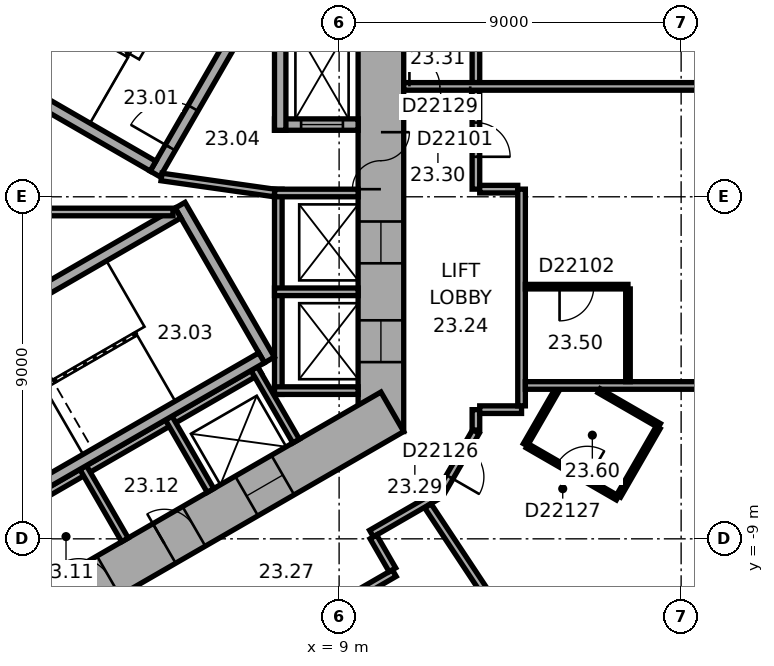
"""IFC4 building model, lengths in metres.
Left out: names, types, materials, properties, quantities, classifications, styles, units other than length and angle.
Written with IfcOpenShell. Run it as: python <this file> out.ifc"""

import sys

from ifc_helpers import new_model, si_unit, direction, frame, frame_2d, origin, place, context, subcontext, project, spatial, rectangle, extrude, element, fill, save


model = new_model("IFC4")
c1 = context("Model", 3, precision=1e-05, world=origin(), true_north=direction((0.0, 1.0)))
c2 = subcontext(c1, "Body", "Model", "MODEL_VIEW")
j1 = project(units=[si_unit("LENGTHUNIT", "METRE"), si_unit("PLANEANGLEUNIT", "RADIAN")], contexts=[c1])
p1 = place(None, origin())
s1 = spatial("IfcSite", under=j1, at=p1, CompositionType="ELEMENT")
p2 = place(p1, origin())
s2 = spatial("IfcBuilding", under=s1, at=p2, CompositionType="ELEMENT")
p3 = place(p2, frame((0.0, 0.0, 100.1)))
s3 = spatial("IfcBuildingStorey", under=s2, at=p3, CompositionType="ELEMENT", Elevation=100.1)
p4 = place(p3, frame((10.1, -6.177, 0.0), z_axis=(0.0, 0.0, 1.0), x_axis=(0.0, 1.0, 0.0)))
e1 = element("IfcWall", 1, at=p4, inside=s3, PredefinedType="SHEAR", context=c2, shape_type="SweptSolid", body=[
    extrude(rectangle(XDim=12.355, YDim=1.2, at=frame_2d((6.177, 0.0))), origin(), (0.0, 0.0, 1.0), 3.3),
])
p5 = place(p4, frame((6.378, 0.0, 0.0)))
e2 = element("IfcOpeningElement", 2, at=p5, cuts=e1, PredefinedType="OPENING", context=c2, shape_type="SweptSolid", body=[
    extrude(rectangle(XDim=1.5, YDim=2.1, at=frame_2d((0.75, 1.05))), frame((0.0, 0.61, 0.0), z_axis=(0.0, -1.0, 0.0), x_axis=(1.0, 0.0, 0.0)), (0.0, 0.0, 1.0), 1.22),
])
p6 = place(p4, frame((1.828, 0.0, 0.0)))
e3 = element("IfcOpeningElement", 3, at=p6, cuts=e1, PredefinedType="OPENING", context=c2, shape_type="SweptSolid", body=[
    extrude(rectangle(XDim=1.1, YDim=2.1, at=frame_2d((0.55, 1.05))), frame((0.0, 0.61, 0.0), z_axis=(0.0, -1.0, 0.0), x_axis=(1.0, 0.0, 0.0)), (0.0, 0.0, 1.0), 1.22),
])
p7 = place(p4, frame((4.427, 0.0, 0.0)))
e4 = element("IfcOpeningElement", 4, at=p7, cuts=e1, PredefinedType="OPENING", context=c2, shape_type="SweptSolid", body=[
    extrude(rectangle(XDim=1.1, YDim=2.1, at=frame_2d((0.55, 1.05))), frame((0.0, 0.61, 0.0), z_axis=(0.0, -1.0, 0.0), x_axis=(1.0, 0.0, 0.0)), (0.0, 0.0, 1.0), 1.22),
])
p8 = place(p3, frame((-0.3, -11.836, 0.0), z_axis=(0.0, 0.0, 1.0), x_axis=(0.866021384402, 0.500006961711, 0.0)))
e5 = element("IfcWall", 5, at=p8, inside=s3, PredefinedType="SHEAR", context=c2, shape_type="SweptSolid", body=[
    extrude(rectangle(XDim=12.355, YDim=1.2, at=frame_2d((6.178, 0.0))), origin(), (0.0, 0.0, 1.0), 3.3),
])
p9 = place(p8, frame((2.828, 0.0, 0.0)))
e6 = element("IfcOpeningElement", 6, at=p9, cuts=e5, PredefinedType="OPENING", context=c2, shape_type="SweptSolid", body=[
    extrude(rectangle(XDim=0.9, YDim=2.1, at=frame_2d((0.45, 1.05))), frame((0.0, 0.61, 0.0), z_axis=(0.0, -1.0, 0.0), x_axis=(1.0, 0.0, 0.0)), (0.0, 0.0, 1.0), 1.22),
])
p10 = place(p8, frame((5.428, 0.0, 0.0)))
e7 = element("IfcOpeningElement", 7, at=p10, cuts=e5, PredefinedType="OPENING", context=c2, shape_type="SweptSolid", body=[
    extrude(rectangle(XDim=0.9, YDim=2.1, at=frame_2d((0.45, 1.05))), frame((0.0, 0.61, 0.0), z_axis=(0.0, -1.0, 0.0), x_axis=(1.0, 0.0, 0.0)), (0.0, 0.0, 1.0), 1.22),
])
p11 = place(p8, frame((7.928, 0.0, 0.0)))
e8 = element("IfcOpeningElement", 8, at=p11, cuts=e5, PredefinedType="OPENING", context=c2, shape_type="SweptSolid", body=[
    extrude(rectangle(XDim=1.1, YDim=2.1, at=frame_2d((0.55, 1.05))), frame((0.0, 0.61, 0.0), z_axis=(0.0, -1.0, 0.0), x_axis=(1.0, 0.0, 0.0)), (0.0, 0.0, 1.0), 1.22),
])
p12 = place(p3, frame((7.4, -5.2, 0.0), z_axis=(0.0, 0.0, 1.0), x_axis=(0.0, 1.0, 0.0)))
e9 = element("IfcWall", 9, at=p12, inside=s3, PredefinedType="PARTITIONING", context=c2, shape_type="SweptSolid", body=[
    extrude(rectangle(XDim=5.4, YDim=0.2, at=frame_2d((2.7, 0.0))), origin(), (0.0, 0.0, 1.0), 3.05),
])
for number, where, z_axis, x_axis in (
    (10, (7.3, -5.1, 0.0), (0.0, 0.0, 1.0), (1.0, 0.0, 0.0)),
    (11, (7.3, -2.5, 0.0), (0.0, 0.0, 1.0), (1.0, 0.0, 0.0)),
    (12, (7.3, 0.1, 0.0), (0.0, 0.0, 1.0), (1.0, 0.0, 0.0)),
):
    element("IfcWall", number, at=place(p3, frame(where, z_axis=z_axis, x_axis=x_axis)), inside=s3, PredefinedType="PARTITIONING", context=c2, shape_type="SweptSolid", body=[
        extrude(rectangle(XDim=2.2, YDim=0.2, at=frame_2d((1.1, 0.0))), origin(), (0.0, 0.0, 1.0), 3.05),
    ])
p13 = place(p3, frame((-0.024, -8.559, 0.0), z_axis=(0.0, 0.0, 1.0), x_axis=(0.866026010844, 0.49999894854, 0.0)))
e13 = element("IfcWall", 13, at=p13, inside=s3, PredefinedType="PARTITIONING", context=c2, shape_type="SweptSolid", body=[
    extrude(rectangle(XDim=8.0, YDim=0.2, at=frame_2d((4.0, 0.0))), origin(), (0.0, 0.0, 1.0), 3.05),
])
for number, where, z_axis, x_axis in (
    (14, (2.264, -7.122, 0.0), (0.0, 0.0, 1.0), (0.5, -0.866, 0.0)),
    (15, (4.516, -5.822, 0.0), (0.0, 0.0, 1.0), (0.5, -0.866, 0.0)),
    (16, (6.768, -4.522, 0.0), (0.0, 0.0, 1.0), (0.5, -0.866, 0.0)),
):
    element("IfcWall", number, at=place(p3, frame(where, z_axis=z_axis, x_axis=x_axis)), inside=s3, PredefinedType="PARTITIONING", context=c2, shape_type="SweptSolid", body=[
        extrude(rectangle(XDim=2.2, YDim=0.2, at=frame_2d((1.1, 0.0))), origin(), (0.0, 0.0, 1.0), 3.05),
    ])
p14 = place(p3, frame((4.158, 0.602, 0.0), z_axis=(0.0, 0.0, 1.0), x_axis=(0.499977259774, 0.866038532462, 0.0)))
e17 = element("IfcWall", 17, at=p14, inside=s3, PredefinedType="SHEAR", context=c2, shape_type="SweptSolid", body=[
    extrude(rectangle(XDim=4.7, YDim=0.3, at=frame_2d((2.35, 0.0))), origin(), (0.0, 0.0, 1.0), 3.05),
])
p15 = place(p14, frame((0.8, 0.0, 0.0)))
e18 = element("IfcOpeningElement", 18, at=p15, cuts=e17, PredefinedType="OPENING", context=c2, shape_type="SweptSolid", body=[
    extrude(rectangle(XDim=1.2, YDim=2.1, at=frame_2d((0.6, 1.05))), frame((0.0, 0.16, 0.0), z_axis=(0.0, -1.0, 0.0), x_axis=(1.0, 0.0, 0.0)), (0.0, 0.0, 1.0), 0.32),
])
p16 = place(p3, frame((4.103, 0.807, 0.0), z_axis=(0.0, 0.0, 1.0), x_axis=(-0.866027801685, 0.499995846692, 0.0)))
e19 = element("IfcWall", 19, at=p16, inside=s3, PredefinedType="SHEAR", context=c2, shape_type="SweptSolid", body=[
    extrude(rectangle(XDim=7.06, YDim=0.3, at=frame_2d((3.53, 0.0))), origin(), (0.0, 0.0, 1.0), 3.05),
])
p17 = place(p3, frame((4.816, -0.222, 0.0), z_axis=(0.0, 0.0, 1.0), x_axis=(0.499977259774, -0.866038532462, 0.0)))
e20 = element("IfcWall", 20, at=p17, inside=s3, PredefinedType="SHEAR", context=c2, shape_type="SweptSolid", body=[
    extrude(rectangle(XDim=4.7, YDim=0.3, at=frame_2d((2.35, 0.0))), origin(), (0.0, 0.0, 1.0), 3.05),
])
for number, where, z_axis, x_axis in (
    (21, (-1.353, -3.957, 0.0), (0.0, 0.0, 1.0), (0.866, 0.5, 0.0)),
    (22, (0.847, -7.767, 0.0), (0.0, 0.0, 1.0), (0.866, 0.5, 0.0)),
):
    element("IfcWall", number, at=place(p3, frame(where, z_axis=z_axis, x_axis=x_axis)), inside=s3, PredefinedType="SHEAR", context=c2, shape_type="SweptSolid", body=[
        extrude(rectangle(XDim=7.06, YDim=0.3, at=frame_2d((3.53, 0.0))), origin(), (0.0, 0.0, 1.0), 3.05),
    ])
p18 = place(p3, frame((7.3, 1.9, 0.0), z_axis=(0.0, 0.0, 1.0), x_axis=(1.0, 0.0, 0.0)))
e23 = element("IfcWall", 23, at=p18, inside=s3, PredefinedType="SHEAR", context=c2, shape_type="SweptSolid", body=[
    extrude(rectangle(XDim=2.2, YDim=0.3, at=frame_2d((1.1, 0.0))), origin(), (0.0, 0.0, 1.0), 3.05),
])
p19 = place(p18, frame((0.7, 0.0, 0.0)))
e24 = element("IfcOpeningElement", 24, at=p19, cuts=e23, PredefinedType="OPENING", context=c2, shape_type="SweptSolid", body=[
    extrude(rectangle(XDim=1.1, YDim=2.1, at=frame_2d((0.55, 1.05))), frame((0.0, 0.16, 0.0), z_axis=(0.0, -1.0, 0.0), x_axis=(1.0, 0.0, 0.0)), (0.0, 0.0, 1.0), 0.32),
])
p20 = place(p3, frame((7.45, 1.75, 0.0), z_axis=(0.0, 0.0, 1.0), x_axis=(0.0, 1.0, 0.0)))
e25 = element("IfcWall", 25, at=p20, inside=s3, PredefinedType="SHEAR", context=c2, shape_type="SweptSolid", body=[
    extrude(rectangle(XDim=3.35, YDim=0.3, at=frame_2d((1.675, 0.0))), origin(), (0.0, 0.0, 1.0), 3.05),
])
p21 = place(p3, frame((4.327, 0.521, 0.0), z_axis=(0.0, 0.0, 1.0), x_axis=(0.990124376366, -0.14019172346, 0.0)))
e26 = element("IfcWall", 26, at=p21, inside=s3, PredefinedType="PARTITIONING", context=c2, shape_type="SweptSolid", body=[
    extrude(rectangle(XDim=3.002, YDim=0.2, at=frame_2d((1.501, 0.0))), origin(), (0.0, 0.0, 1.0), 3.05),
])
p22 = place(p3, frame((-2.72, -0.4, 0.0), z_axis=(0.0, 0.0, 1.0), x_axis=(1.0, 0.0, 0.0)))
e27 = element("IfcWall", 27, at=p22, inside=s3, PredefinedType="PARTITIONING", context=c2, shape_type="SweptSolid", body=[
    extrude(rectangle(XDim=7.347, YDim=0.2, at=frame_2d((3.674, 0.0))), origin(), (0.0, 0.0, 1.0), 3.05),
])
p23 = place(p3, frame((7.419, -11.653, 0.0), z_axis=(0.0, 0.0, 1.0), x_axis=(0.866038154057, 0.49997791523, 0.0)))
e28 = element("IfcWall", 28, at=p23, inside=s3, PredefinedType="PARTITIONING", context=c2, shape_type="SweptSolid", body=[
    extrude(rectangle(XDim=3.502, YDim=0.2, at=frame_2d((1.751, 0.0))), origin(), (0.0, 0.0, 1.0), 3.05),
])
p24 = place(p3, frame((9.852, -8.861, 0.0), z_axis=(0.0, 0.0, 1.0), x_axis=(0.866013291437, 0.500020978615, 0.0)))
e29 = element("IfcWall", 29, at=p24, inside=s3, PredefinedType="PARTITIONING", context=c2, shape_type="SweptSolid", body=[
    extrude(rectangle(XDim=2.077, YDim=0.2, at=frame_2d((1.038, 0.0))), origin(), (0.0, 0.0, 1.0), 3.05),
])
p25 = place(p3, frame((10.402, -9.815, 0.0), z_axis=(0.0, 0.0, 1.0), x_axis=(-0.499968756647, 0.866043441391, 0.0)))
e30 = element("IfcWall", 30, at=p25, inside=s3, PredefinedType="PARTITIONING", context=c2, shape_type="SweptSolid", body=[
    extrude(rectangle(XDim=1.001, YDim=0.2, at=frame_2d((0.5, 0.0))), origin(), (0.0, 0.0, 1.0), 3.05),
])
p26 = place(p3, frame((11.67, -7.788, 0.0), z_axis=(0.0, 0.0, 1.0), x_axis=(0.500063286585, 0.865988862174, 0.0)))
e31 = element("IfcWall", 31, at=p26, inside=s3, PredefinedType="PARTITIONING", context=c2, shape_type="SweptSolid", body=[
    extrude(rectangle(XDim=1.86, YDim=0.2, at=frame_2d((0.93, 0.0))), origin(), (0.0, 0.0, 1.0), 3.05),
])
p27 = place(p26, frame((0.48, 0.0, 0.0)))
e32 = element("IfcOpeningElement", 32, at=p27, cuts=e31, PredefinedType="OPENING", context=c2, shape_type="SweptSolid", body=[
    extrude(rectangle(XDim=0.9, YDim=2.1, at=frame_2d((0.45, 1.05))), frame((0.0, 0.11, 0.0), z_axis=(0.0, -1.0, 0.0), x_axis=(1.0, 0.0, 0.0)), (0.0, 0.0, 1.0), 0.22),
])
p28 = place(p3, frame((12.6, -6.138, 0.0), z_axis=(0.0, 0.0, 1.0), x_axis=(0.0, 1.0, 0.0)))
e33 = element("IfcWall", 33, at=p28, inside=s3, PredefinedType="PARTITIONING", context=c2, shape_type="SweptSolid", body=[
    extrude(rectangle(XDim=0.537, YDim=0.2, at=frame_2d((0.268, 0.0))), origin(), (0.0, 0.0, 1.0), 3.05),
])
p29 = place(p3, frame((12.6, 0.201, 0.0), z_axis=(0.0, 0.0, 1.0), x_axis=(0.0, 1.0, 0.0)))
e34 = element("IfcWall", 34, at=p29, inside=s3, PredefinedType="PARTITIONING", context=c2, shape_type="SweptSolid", body=[
    extrude(rectangle(XDim=2.604, YDim=0.2, at=frame_2d((1.302, 0.0))), origin(), (0.0, 0.0, 1.0), 3.05),
])
p30 = place(p29, frame((0.852, 0.0, 0.0)))
e35 = element("IfcOpeningElement", 35, at=p30, cuts=e34, PredefinedType="OPENING", context=c2, shape_type="SweptSolid", body=[
    extrude(rectangle(XDim=0.9, YDim=2.1, at=frame_2d((0.45, 1.05))), frame((0.0, 0.11, 0.0), z_axis=(0.0, -1.0, 0.0), x_axis=(1.0, 0.0, 0.0)), (0.0, 0.0, 1.0), 0.22),
])
p31 = place(p3, frame((12.6, 3.004, 0.0), z_axis=(0.0, 0.0, 1.0), x_axis=(0.0, 1.0, 0.0)))
e36 = element("IfcWall", 36, at=p31, inside=s3, PredefinedType="PARTITIONING", context=c2, shape_type="SweptSolid", body=[
    extrude(rectangle(XDim=3.173, YDim=0.2, at=frame_2d((1.586, 0.0))), origin(), (0.0, 0.0, 1.0), 3.05),
])
p32 = place(p31, frame((1.136, 0.0, 0.0)))
e37 = element("IfcOpeningElement", 37, at=p32, cuts=e36, PredefinedType="OPENING", context=c2, shape_type="SweptSolid", body=[
    extrude(rectangle(XDim=0.9, YDim=2.1, at=frame_2d((0.45, 1.05))), frame((0.0, 0.11, 0.0), z_axis=(0.0, -1.0, 0.0), x_axis=(1.0, 0.0, 0.0)), (0.0, 0.0, 1.0), 0.22),
])
p33 = place(p3, frame((12.7, -5.601, 0.0), z_axis=(0.0, 0.0, 1.0), x_axis=(1.0, 0.0, 0.0)))
e38 = element("IfcWall", 38, at=p33, inside=s3, PredefinedType="PARTITIONING", context=c2, shape_type="SweptSolid", body=[
    extrude(rectangle(XDim=1.101, YDim=0.2, at=frame_2d((0.551, 0.0))), origin(), (0.0, 0.0, 1.0), 3.05),
])
p34 = place(p3, frame((13.701, 0.201, 0.0), z_axis=(0.0, 0.0, 1.0), x_axis=(-1.0, 0.0, 0.0)))
e39 = element("IfcWall", 39, at=p34, inside=s3, PredefinedType="PARTITIONING", context=c2, shape_type="SweptSolid", body=[
    extrude(rectangle(XDim=1.001, YDim=0.2, at=frame_2d((0.5, 0.0))), origin(), (0.0, 0.0, 1.0), 3.05),
])
p35 = place(p3, frame((13.801, -5.501, 0.0), z_axis=(0.0, 0.0, 1.0), x_axis=(0.0, 1.0, 0.0)))
e40 = element("IfcWall", 40, at=p35, inside=s3, PredefinedType="PARTITIONING", context=c2, shape_type="SweptSolid", body=[
    extrude(rectangle(XDim=5.702, YDim=0.2, at=frame_2d((2.851, 0.0))), origin(), (0.0, 0.0, 1.0), 3.05),
])
p36 = place(p3, frame((13.901, -6.524, 0.0), z_axis=(0.0, 0.0, 1.0), x_axis=(0.499964162598, 0.86604609353, 0.0)))
e41 = element("IfcWall", 41, at=p36, inside=s3, PredefinedType="PARTITIONING", context=c2, shape_type="SweptSolid", body=[
    extrude(rectangle(XDim=1.661, YDim=0.12, at=frame_2d((0.831, 0.0))), origin(), (0.0, 0.0, 1.0), 3.05),
])
p37 = place(p3, frame((13.901, -4.965, 0.0), z_axis=(0.0, 0.0, 1.0), x_axis=(1.0, 0.0, 0.0)))
e42 = element("IfcWall", 42, at=p37, inside=s3, PredefinedType="PARTITIONING", context=c2, shape_type="SweptSolid", body=[
    extrude(rectangle(XDim=8.049, YDim=0.2, at=frame_2d((4.024, 0.0))), origin(), (0.0, 0.0, 1.0), 3.05),
])
p38 = place(p3, frame((13.901, -2.365, 0.0), z_axis=(0.0, 0.0, 1.0), x_axis=(1.0, 0.0, 0.0)))
e43 = element("IfcWall", 43, at=p38, inside=s3, PredefinedType="PARTITIONING", context=c2, shape_type="SweptSolid", body=[
    extrude(rectangle(XDim=2.7, YDim=0.12, at=frame_2d((1.35, 0.0))), origin(), (0.0, 0.0, 1.0), 3.05),
])
p39 = place(p38, frame((0.9, 0.0, 0.0)))
e44 = element("IfcOpeningElement", 44, at=p39, cuts=e43, PredefinedType="OPENING", context=c2, shape_type="SweptSolid", body=[
    extrude(rectangle(XDim=0.9, YDim=2.1, at=frame_2d((0.45, 1.05))), frame((0.0, 0.07, 0.0), z_axis=(0.0, -1.0, 0.0), x_axis=(1.0, 0.0, 0.0)), (0.0, 0.0, 1.0), 0.14),
])
p40 = place(p3, frame((15.841, -5.104, 0.0), z_axis=(0.0, 0.0, 1.0), x_axis=(0.866025591402, -0.499999675036, 0.0)))
e45 = element("IfcWall", 45, at=p40, inside=s3, PredefinedType="PARTITIONING", context=c2, shape_type="SweptSolid", body=[
    extrude(rectangle(XDim=1.83, YDim=0.12, at=frame_2d((0.915, 0.0))), origin(), (0.0, 0.0, 1.0), 3.05),
])
p41 = place(p3, frame((16.255, -15.564, 0.0), z_axis=(0.0, 0.0, 1.0), x_axis=(-0.55192208744, 0.833895682562, 0.0)))
e46 = element("IfcWall", 46, at=p41, inside=s3, PredefinedType="PARTITIONING", context=c2, shape_type="SweptSolid", body=[
    extrude(rectangle(XDim=8.913, YDim=0.2, at=frame_2d((4.457, 0.0))), origin(), (0.0, 0.0, 1.0), 2.6),
])
p42 = place(p3, frame((16.326, -7.925, 0.0), z_axis=(0.0, 0.0, 1.0), x_axis=(-0.865997131366, 0.500048966069, 0.0)))
e47 = element("IfcWall", 47, at=p42, inside=s3, PredefinedType="PARTITIONING", context=c2, shape_type="SweptSolid", body=[
    extrude(rectangle(XDim=2.74, YDim=0.12, at=frame_2d((1.37, 0.0))), origin(), (0.0, 0.0, 1.0), 3.05),
])
p43 = place(p42, frame((0.92, 0.0, 0.0)))
e48 = element("IfcOpeningElement", 48, at=p43, cuts=e47, PredefinedType="OPENING", context=c2, shape_type="SweptSolid", body=[
    extrude(rectangle(XDim=0.9, YDim=2.1, at=frame_2d((0.45, 1.05))), frame((0.0, 0.07, 0.0), z_axis=(0.0, -1.0, 0.0), x_axis=(1.0, 0.0, 0.0)), (0.0, 0.0, 1.0), 0.14),
])
p44 = place(p3, frame((16.601, -2.425, 0.0), z_axis=(0.0, 0.0, 1.0), x_axis=(0.0, -1.0, 0.0)))
e49 = element("IfcWall", 49, at=p44, inside=s3, PredefinedType="PARTITIONING", context=c2, shape_type="SweptSolid", body=[
    extrude(rectangle(XDim=2.44, YDim=0.12, at=frame_2d((1.22, 0.0))), origin(), (0.0, 0.0, 1.0), 3.05),
])
p45 = place(p3, frame((17.396, -6.071, 0.0), z_axis=(0.0, 0.0, 1.0), x_axis=(-0.500027264788, -0.866009661879, 0.0)))
e50 = element("IfcWall", 50, at=p45, inside=s3, PredefinedType="PARTITIONING", context=c2, shape_type="SweptSolid", body=[
    extrude(rectangle(XDim=2.08, YDim=0.12, at=frame_2d((1.04, 0.0))), origin(), (0.0, 0.0, 1.0), 3.05),
])
p46 = place(p3, frame((21.95, 2.905, 0.0), z_axis=(0.0, 0.0, 1.0), x_axis=(-1.0, 0.0, 0.0)))
e51 = element("IfcWall", 51, at=p46, inside=s3, PredefinedType="PARTITIONING", context=c2, shape_type="SweptSolid", body=[
    extrude(rectangle(XDim=11.25, YDim=0.2, at=frame_2d((5.625, 0.0))), origin(), (0.0, 0.0, 1.0), 3.05),
])
p47 = place(p46, frame((9.5, 0.0, 0.0)))
e52 = element("IfcOpeningElement", 52, at=p47, cuts=e51, PredefinedType="OPENING", context=c2, shape_type="SweptSolid", body=[
    extrude(rectangle(XDim=1.6, YDim=2.1, at=frame_2d((0.8, 1.05))), frame((0.0, 0.11, 0.0), z_axis=(0.0, -1.0, 0.0), x_axis=(1.0, 0.0, 0.0)), (0.0, 0.0, 1.0), 0.22),
])
p48 = place(p5, origin())
e53 = element("IfcDoor", 53, at=p48, inside=s3, OperationType="DOUBLE_DOOR_SINGLE_SWING", PredefinedType="DOOR", context=c2, shape_type="SweptSolid", body=[
    extrude(rectangle(XDim=1.5, YDim=2.1, at=frame_2d((0.75, 1.05))), frame((0.0, 0.025, 0.0), z_axis=(0.0, -1.0, 0.0), x_axis=(1.0, 0.0, 0.0)), (0.0, 0.0, 1.0), 0.05),
])
fill(e2, e53)
p49 = place(p15, origin())
e54 = element("IfcDoor", 54, at=p49, inside=s3, OperationType="SINGLE_SWING_RIGHT", PredefinedType="DOOR", context=c2, shape_type="SweptSolid", body=[
    extrude(rectangle(XDim=1.2, YDim=2.1, at=frame_2d((0.6, 1.05))), frame((0.0, 0.025, 0.0), z_axis=(0.0, -1.0, 0.0), x_axis=(1.0, 0.0, 0.0)), (0.0, 0.0, 1.0), 0.05),
])
fill(e18, e54)
p50 = place(p9, origin())
e55 = element("IfcDoor", 55, at=p50, inside=s3, OperationType="SINGLE_SWING_LEFT", PredefinedType="DOOR", context=c2, shape_type="SweptSolid", body=[
    extrude(rectangle(XDim=0.9, YDim=2.1, at=frame_2d((0.45, 1.05))), frame((0.0, 0.025, 0.0), z_axis=(0.0, -1.0, 0.0), x_axis=(1.0, 0.0, 0.0)), (0.0, 0.0, 1.0), 0.05),
])
fill(e6, e55)
p51 = place(p10, origin())
e56 = element("IfcDoor", 56, at=p51, inside=s3, OperationType="SINGLE_SWING_LEFT", PredefinedType="DOOR", context=c2, shape_type="SweptSolid", body=[
    extrude(rectangle(XDim=0.9, YDim=2.1, at=frame_2d((0.45, 1.05))), frame((0.0, 0.025, 0.0), z_axis=(0.0, -1.0, 0.0), x_axis=(1.0, 0.0, 0.0)), (0.0, 0.0, 1.0), 0.05),
])
fill(e7, e56)
p52 = place(p19, origin())
e57 = element("IfcDoor", 57, at=p52, inside=s3, OperationType="DOUBLE_DOOR_SLIDING", PredefinedType="DOOR", context=c2, shape_type="SweptSolid", body=[
    extrude(rectangle(XDim=1.1, YDim=2.1, at=frame_2d((0.55, 1.05))), frame((0.0, 0.025, 0.0), z_axis=(0.0, -1.0, 0.0), x_axis=(1.0, 0.0, 0.0)), (0.0, 0.0, 1.0), 0.05),
])
fill(e24, e57)
p53 = place(p6, origin())
e58 = element("IfcDoor", 58, at=p53, inside=s3, OperationType="DOUBLE_DOOR_SLIDING", PredefinedType="DOOR", context=c2, shape_type="SweptSolid", body=[
    extrude(rectangle(XDim=1.1, YDim=2.1, at=frame_2d((0.55, 1.05))), frame((0.0, 0.025, 0.0), z_axis=(0.0, -1.0, 0.0), x_axis=(1.0, 0.0, 0.0)), (0.0, 0.0, 1.0), 0.05),
])
fill(e3, e58)
p54 = place(p7, origin())
e59 = element("IfcDoor", 59, at=p54, inside=s3, OperationType="DOUBLE_DOOR_SLIDING", PredefinedType="DOOR", context=c2, shape_type="SweptSolid", body=[
    extrude(rectangle(XDim=1.1, YDim=2.1, at=frame_2d((0.55, 1.05))), frame((0.0, 0.025, 0.0), z_axis=(0.0, -1.0, 0.0), x_axis=(1.0, 0.0, 0.0)), (0.0, 0.0, 1.0), 0.05),
])
fill(e4, e59)
p55 = place(p11, origin())
e60 = element("IfcDoor", 60, at=p55, inside=s3, OperationType="DOUBLE_DOOR_SLIDING", PredefinedType="DOOR", context=c2, shape_type="SweptSolid", body=[
    extrude(rectangle(XDim=1.1, YDim=2.1, at=frame_2d((0.55, 1.05))), frame((0.0, 0.025, 0.0), z_axis=(0.0, -1.0, 0.0), x_axis=(1.0, 0.0, 0.0)), (0.0, 0.0, 1.0), 0.05),
])
fill(e8, e60)
p56 = place(p30, origin())
e61 = element("IfcDoor", 61, at=p56, inside=s3, OperationType="SINGLE_SWING_LEFT", PredefinedType="DOOR", context=c2, shape_type="SweptSolid", body=[
    extrude(rectangle(XDim=0.9, YDim=2.1, at=frame_2d((0.45, 1.05))), frame((0.0, 0.025, 0.0), z_axis=(0.0, -1.0, 0.0), x_axis=(1.0, 0.0, 0.0)), (0.0, 0.0, 1.0), 0.05),
])
fill(e35, e61)
p57 = place(p39, origin())
e62 = element("IfcDoor", 62, at=p57, inside=s3, OperationType="SINGLE_SWING_LEFT", PredefinedType="DOOR", context=c2, shape_type="SweptSolid", body=[
    extrude(rectangle(XDim=0.9, YDim=2.1, at=frame_2d((0.45, 1.05))), frame((0.0, 0.025, 0.0), z_axis=(0.0, -1.0, 0.0), x_axis=(1.0, 0.0, 0.0)), (0.0, 0.0, 1.0), 0.05),
])
fill(e44, e62)
p58 = place(p27, origin())
e63 = element("IfcDoor", 63, at=p58, inside=s3, OperationType="SINGLE_SWING_LEFT", PredefinedType="DOOR", context=c2, shape_type="SweptSolid", body=[
    extrude(rectangle(XDim=0.9, YDim=2.1, at=frame_2d((0.45, 1.05))), frame((0.0, 0.025, 0.0), z_axis=(0.0, -1.0, 0.0), x_axis=(1.0, 0.0, 0.0)), (0.0, 0.0, 1.0), 0.05),
])
fill(e32, e63)
p59 = place(p43, origin())
e64 = element("IfcDoor", 64, at=p59, inside=s3, OperationType="SINGLE_SWING_LEFT", PredefinedType="DOOR", context=c2, shape_type="SweptSolid", body=[
    extrude(rectangle(XDim=0.9, YDim=2.1, at=frame_2d((0.45, 1.05))), frame((0.0, 0.025, 0.0), z_axis=(0.0, -1.0, 0.0), x_axis=(1.0, 0.0, 0.0)), (0.0, 0.0, 1.0), 0.05),
])
fill(e48, e64)
p60 = place(p47, origin())
e65 = element("IfcDoor", 65, at=p60, inside=s3, OperationType="DOUBLE_DOOR_SINGLE_SWING", PredefinedType="DOOR", context=c2, shape_type="SweptSolid", body=[
    extrude(rectangle(XDim=1.6, YDim=2.1, at=frame_2d((0.8, 1.05))), frame((0.0, 0.025, 0.0), z_axis=(0.0, -1.0, 0.0), x_axis=(1.0, 0.0, 0.0)), (0.0, 0.0, 1.0), 0.05),
])
fill(e52, e65)
save(model, sys.argv[1])
